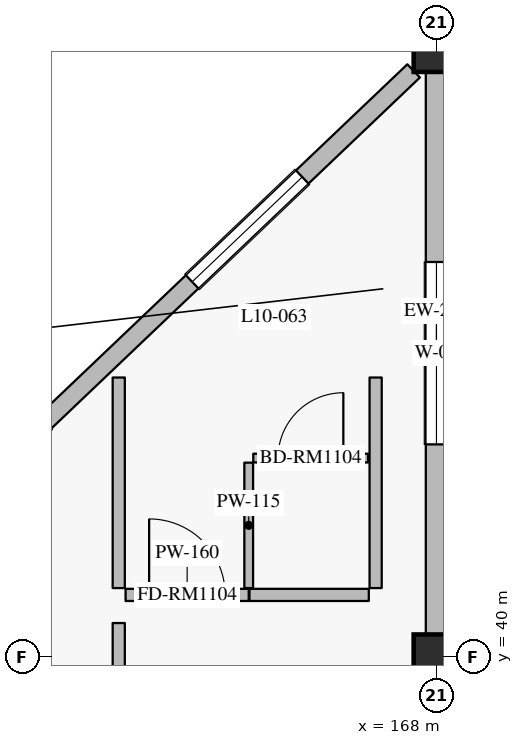
"""IFC4 building model, lengths in metres.
Left out: names, types, materials, properties, quantities, classifications, styles, units other than length and angle.
Written with IfcOpenShell. Run it as: python <this file> out.ifc"""

import sys

from ifc_helpers import new_model, si_unit, direction, frame, frame_2d, origin, origin_2d, place, context, subcontext, project, spatial, rectangle, extrude, element, fill, save


model = new_model("IFC4")
c1 = context("Model", 3, precision=1e-05, world=origin(), true_north=direction((0.0, 1.0)))
c2 = subcontext(c1, "Body", "Model", "MODEL_VIEW")
j1 = project(units=[si_unit("LENGTHUNIT", "METRE"), si_unit("PLANEANGLEUNIT", "RADIAN")], contexts=[c1])
p1 = place(None, origin())
s1 = spatial("IfcSite", under=j1, at=p1, CompositionType="ELEMENT")
p2 = place(p1, origin())
s2 = spatial("IfcBuilding", under=s1, at=p2, CompositionType="ELEMENT")
p3 = place(p2, frame((0.0, 0.0, 43.2)))
s3 = spatial("IfcBuildingStorey", under=s2, at=p3, CompositionType="ELEMENT", Elevation=43.2)
for number, where, z_axis, x_axis in (
    (1, (168.0, 48.0, 0.0), (0.0, 0.0, 1.0), (1.0, 0.0, 0.0)),
    (2, (168.0, 40.0, 0.0), (0.0, 0.0, 1.0), (1.0, 0.0, 0.0)),
):
    element("IfcColumn", number, at=place(p3, frame(where, z_axis=z_axis, x_axis=x_axis)), inside=s3, PredefinedType="COLUMN", context=c2, shape_type="SweptSolid", body=[
        extrude(rectangle(XDim=0.6, YDim=0.6, at=origin_2d()), origin(), (0.0, 0.0, 1.0), 4.2),
    ])
p4 = place(p3, frame((159.9, 40.286, 0.0), z_axis=(0.0, 0.0, 1.0), x_axis=(0.724156257633, 0.689635928973, 0.0)))
e3 = element("IfcWall", 3, at=p4, inside=s3, PredefinedType="SOLIDWALL", context=c2, shape_type="SweptSolid", body=[
    extrude(rectangle(XDim=10.771, YDim=0.24, at=frame_2d((5.386, 0.0))), origin(), (0.0, 0.0, 1.0), 3.49),
])
p5 = place(p4, frame((2.073, 0.0, 0.8)))
e4 = element("IfcOpeningElement", 4, at=p5, cuts=e3, PredefinedType="OPENING", context=c2, shape_type="SweptSolid", body=[
    extrude(rectangle(XDim=2.0, YDim=1.75, at=frame_2d((1.0, 0.875))), frame((0.0, 0.13, 0.0), z_axis=(0.0, -1.0, 0.0), x_axis=(1.0, 0.0, 0.0)), (0.0, 0.0, 1.0), 0.26),
])
p6 = place(p4, frame((6.747, 0.0, 0.8)))
e5 = element("IfcOpeningElement", 5, at=p6, cuts=e3, PredefinedType="OPENING", context=c2, shape_type="SweptSolid", body=[
    extrude(rectangle(XDim=2.0, YDim=1.75, at=frame_2d((1.0, 0.875))), frame((0.0, 0.13, 0.0), z_axis=(0.0, -1.0, 0.0), x_axis=(1.0, 0.0, 0.0)), (0.0, 0.0, 1.0), 0.26),
])
p7 = place(p3, frame((168.0, 47.7, 0.0), z_axis=(0.0, 0.0, 1.0), x_axis=(0.0, -1.0, 0.0)))
e6 = element("IfcWall", 6, at=p7, inside=s3, PredefinedType="SOLIDWALL", context=c2, shape_type="SweptSolid", body=[
    extrude(rectangle(XDim=7.4, YDim=0.28, at=frame_2d((3.7, 0.0))), origin(), (0.0, 0.0, 1.0), 3.3),
])
p8 = place(p7, frame((2.5, 0.0, 0.75)))
e7 = element("IfcOpeningElement", 7, at=p8, cuts=e6, PredefinedType="OPENING", context=c2, shape_type="SweptSolid", body=[
    extrude(rectangle(XDim=2.4, YDim=1.65, at=frame_2d((1.2, 0.825))), frame((0.0, 0.15, 0.0), z_axis=(0.0, -1.0, 0.0), x_axis=(1.0, 0.0, 0.0)), (0.0, 0.0, 1.0), 0.3),
])
p9 = place(p3, frame((163.82, 32.26, 0.0), z_axis=(0.0, 0.0, 1.0), x_axis=(0.0, 1.0, 0.0)))
e8 = element("IfcWall", 8, at=p9, inside=s3, PredefinedType="PARTITIONING", context=c2, shape_type="SweptSolid", body=[
    extrude(rectangle(XDim=8.19, YDim=0.16, at=frame_2d((4.095, 0.0))), origin(), (0.0, 0.0, 1.0), 3.935),
])
p10 = place(p3, frame((163.91, 40.82, 0.0), z_axis=(0.0, 0.0, 1.0), x_axis=(1.0, 0.0, 0.0)))
e9 = element("IfcWall", 9, at=p10, inside=s3, PredefinedType="PARTITIONING", context=c2, shape_type="SweptSolid", body=[
    extrude(rectangle(XDim=1.62, YDim=0.16, at=frame_2d((0.81, 0.0))), origin(), (0.0, 0.0, 1.0), 3.935),
])
p11 = place(p10, frame((0.31, 0.0, 0.0)))
e10 = element("IfcOpeningElement", 10, at=p11, cuts=e9, PredefinedType="OPENING", context=c2, shape_type="SweptSolid", body=[
    extrude(rectangle(XDim=1.0, YDim=2.25, at=frame_2d((0.5, 1.125))), frame((0.0, 0.09, 0.0), z_axis=(0.0, -1.0, 0.0), x_axis=(1.0, 0.0, 0.0)), (0.0, 0.0, 1.0), 0.18),
])
p12 = place(p3, frame((165.54, 40.82, 0.0), z_axis=(0.0, 0.0, 1.0), x_axis=(1.0, 0.0, 0.0)))
e11 = element("IfcWall", 11, at=p12, inside=s3, PredefinedType="PARTITIONING", context=c2, shape_type="SweptSolid", body=[
    extrude(rectangle(XDim=1.57, YDim=0.16, at=frame_2d((0.785, 0.0))), origin(), (0.0, 0.0, 1.0), 3.935),
])
p13 = place(p3, frame((165.53, 40.91, 0.0), z_axis=(0.0, 0.0, 1.0), x_axis=(0.0, 1.0, 0.0)))
e12 = element("IfcWall", 12, at=p13, inside=s3, PredefinedType="PARTITIONING", context=c2, shape_type="SweptSolid", body=[
    extrude(rectangle(XDim=1.65, YDim=0.115, at=frame_2d((0.825, 0.0))), origin(), (0.0, 0.0, 1.0), 3.935),
])
p14 = place(p3, frame((165.59, 42.62, 0.0), z_axis=(0.0, 0.0, 1.0), x_axis=(1.0, 0.0, 0.0)))
e13 = element("IfcWall", 13, at=p14, inside=s3, PredefinedType="PARTITIONING", context=c2, shape_type="SweptSolid", body=[
    extrude(rectangle(XDim=1.51, YDim=0.115, at=frame_2d((0.755, 0.0))), origin(), (0.0, 0.0, 1.0), 3.935),
])
p15 = place(p14, frame((0.325, 0.0, 0.0)))
e14 = element("IfcOpeningElement", 14, at=p15, cuts=e13, PredefinedType="OPENING", context=c2, shape_type="SweptSolid", body=[
    extrude(rectangle(XDim=0.86, YDim=2.12, at=frame_2d((0.43, 1.06))), frame((0.0, 0.067, 0.0), z_axis=(0.0, -1.0, 0.0), x_axis=(1.0, 0.0, 0.0)), (0.0, 0.0, 1.0), 0.135),
])
for number, where, z_axis, x_axis in (
    (15, (163.82, 40.91, 0.0), (0.0, 0.0, 1.0), (0.0, 1.0, 0.0)),
    (16, (167.2, 40.91, 0.0), (0.0, 0.0, 1.0), (0.0, 1.0, 0.0)),
):
    element("IfcWall", number, at=place(p3, frame(where, z_axis=z_axis, x_axis=x_axis)), inside=s3, PredefinedType="PARTITIONING", context=c2, shape_type="SweptSolid", body=[
        extrude(rectangle(XDim=2.77, YDim=0.16, at=frame_2d((1.385, 0.0))), origin(), (0.0, 0.0, 1.0), 3.935),
    ])
p16 = place(p6, origin())
e17 = element("IfcWindow", 17, at=p16, inside=s3, PartitioningType="DOUBLE_PANEL_VERTICAL", PredefinedType="WINDOW", context=c2, shape_type="SweptSolid", body=[
    extrude(rectangle(XDim=2.0, YDim=1.75, at=frame_2d((1.0, 0.875))), frame((0.0, 0.03, 0.0), z_axis=(0.0, -1.0, 0.0), x_axis=(1.0, 0.0, 0.0)), (0.0, 0.0, 1.0), 0.06),
])
fill(e5, e17)
p17 = place(p8, origin())
e18 = element("IfcWindow", 18, at=p17, inside=s3, PartitioningType="DOUBLE_PANEL_VERTICAL", PredefinedType="WINDOW", context=c2, shape_type="SweptSolid", body=[
    extrude(rectangle(XDim=2.4, YDim=1.65, at=frame_2d((1.2, 0.825))), frame((0.0, 0.03, 0.0), z_axis=(0.0, -1.0, 0.0), x_axis=(1.0, 0.0, 0.0)), (0.0, 0.0, 1.0), 0.06),
])
fill(e7, e18)
p18 = place(p11, origin())
e19 = element("IfcDoor", 19, at=p18, inside=s3, OperationType="SINGLE_SWING_LEFT", PredefinedType="DOOR", context=c2, shape_type="SweptSolid", body=[
    extrude(rectangle(XDim=1.0, YDim=2.25, at=frame_2d((0.5, 1.125))), frame((0.0, 0.025, 0.0), z_axis=(0.0, -1.0, 0.0), x_axis=(1.0, 0.0, 0.0)), (0.0, 0.0, 1.0), 0.05),
])
fill(e10, e19)
p19 = place(p15, origin())
e20 = element("IfcDoor", 20, at=p19, inside=s3, OperationType="SINGLE_SWING_RIGHT", PredefinedType="DOOR", context=c2, shape_type="SweptSolid", body=[
    extrude(rectangle(XDim=0.86, YDim=2.12, at=frame_2d((0.43, 1.06))), frame((0.0, 0.025, 0.0), z_axis=(0.0, -1.0, 0.0), x_axis=(1.0, 0.0, 0.0)), (0.0, 0.0, 1.0), 0.05),
])
fill(e14, e20)
save(model, sys.argv[1])
